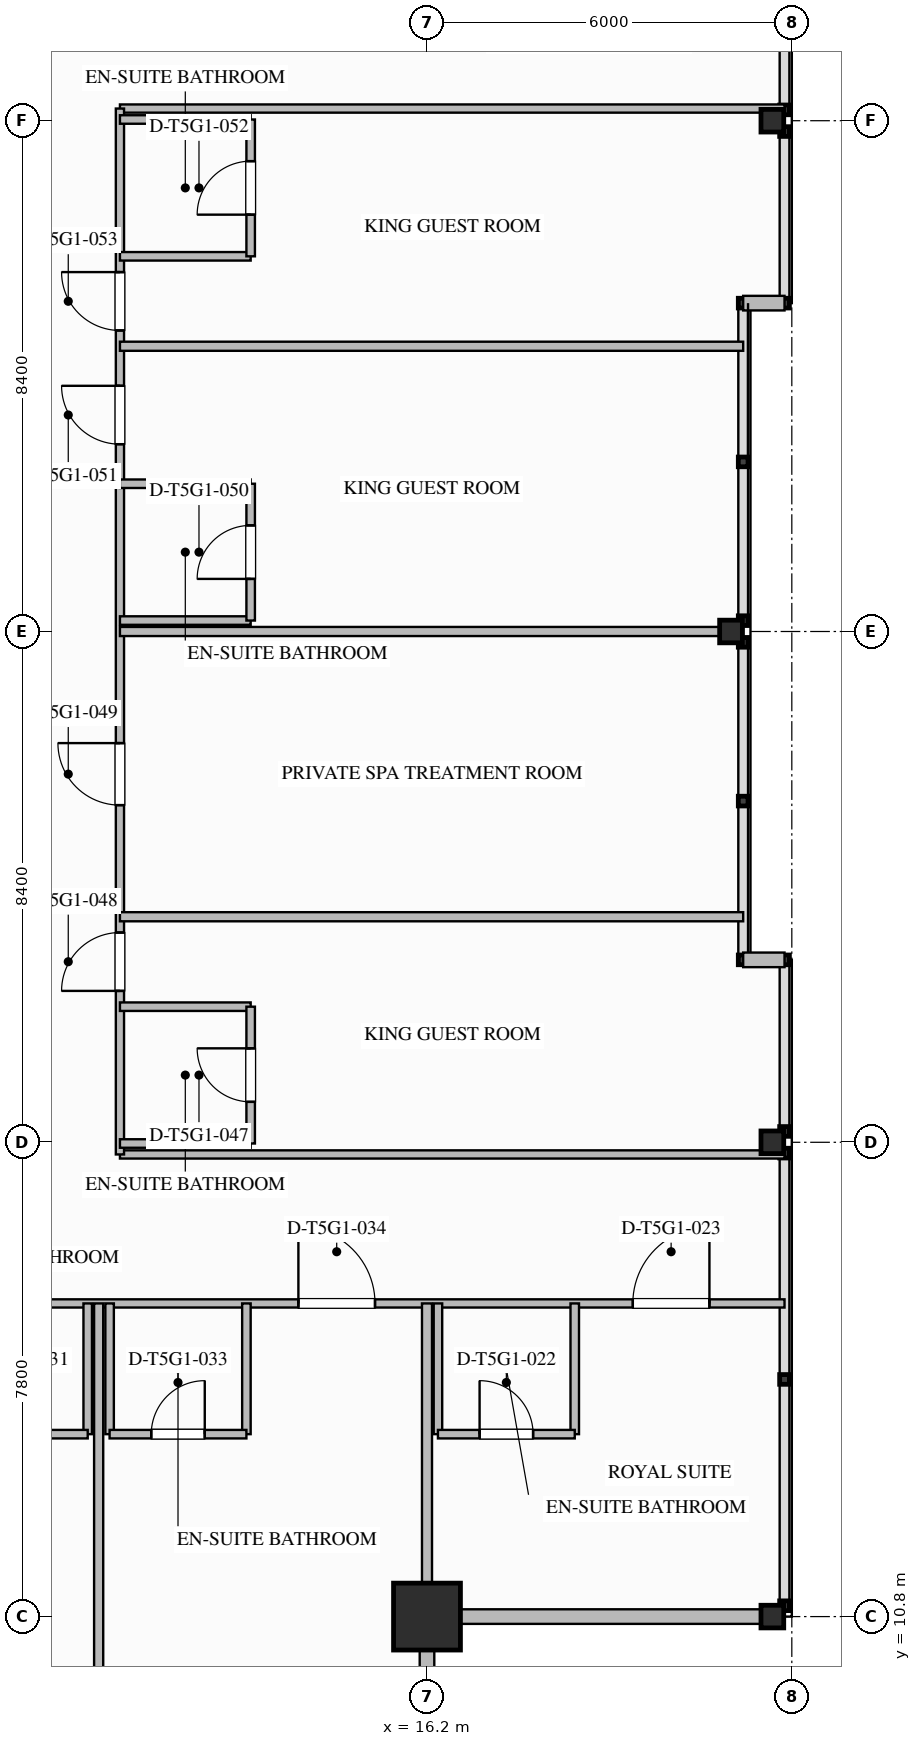
"""IFC4 building model, lengths in metres.
Left out: names, types, materials, properties, quantities, classifications, styles, units other than length and angle.
Written with IfcOpenShell. Run it as: python <this file> out.ifc"""

import sys

from ifc_helpers import new_model, si_unit, direction, frame, frame_2d, origin, origin_2d, place, context, subcontext, project, spatial, rectangle, i_section, extrude, element, fill, save


model = new_model("IFC4")
c1 = context("Model", 3, precision=1e-05, world=origin(), true_north=direction((0.0, 1.0)))
c2 = subcontext(c1, "Body", "Model", "MODEL_VIEW")
j1 = project(units=[si_unit("LENGTHUNIT", "METRE"), si_unit("PLANEANGLEUNIT", "RADIAN")], contexts=[c1])
p1 = place(None, origin())
s1 = spatial("IfcSite", under=j1, at=p1, CompositionType="ELEMENT")
p2 = place(p1, origin())
s2 = spatial("IfcBuilding", under=s1, at=p2, CompositionType="ELEMENT")
p3 = place(p2, frame((0.0, 0.0, 265.0)))
s3 = spatial("IfcBuildingStorey", under=s2, at=p3, CompositionType="ELEMENT", Elevation=265.0)
p4 = place(p3, frame((16.2, 10.8, 0.0), z_axis=(0.0, 0.0, 1.0), x_axis=(1.0, 0.0, 0.0)))
e1 = element("IfcColumn", 1, at=p4, inside=s3, PredefinedType="COLUMN", context=c2, shape_type="SweptSolid", body=[
    extrude(rectangle(XDim=1.1, YDim=1.1, at=origin_2d()), origin(), (0.0, 0.0, 1.0), 3.65),
])
for number, where, z_axis, x_axis in (
    (2, (21.88, 10.8, 0.0), (0.0, 0.0, 1.0), (1.0, 0.0, 0.0)),
    (3, (21.88, 18.6, 0.0), (0.0, 0.0, 1.0), (1.0, 0.0, 0.0)),
    (4, (21.2, 27.0, 0.0), (0.0, 0.0, 1.0), (1.0, 0.0, 0.0)),
    (5, (21.88, 35.4, 0.0), (0.0, 0.0, 1.0), (1.0, 0.0, 0.0)),
):
    element("IfcColumn", number, at=place(p3, frame(where, z_axis=z_axis, x_axis=x_axis)), inside=s3, PredefinedType="COLUMN", context=c2, shape_type="SweptSolid", body=[
        extrude(i_section(OverallWidth=0.374, OverallDepth=0.372, WebThickness=0.016, FlangeThickness=0.026, FilletRadius=0.025, at=origin_2d()), origin(), (0.0, 0.0, 1.0), 3.647),
    ])
for number, where, z_axis, x_axis in (
    (6, (22.08, 10.8, 0.0), (0.0, 0.0, 1.0), (-1.0, 0.0, 0.0)),
    (7, (16.2, 10.8, 0.0), (0.0, 0.0, 1.0), (0.0, -1.0, 0.0)),
):
    element("IfcWall", number, at=place(p3, frame(where, z_axis=z_axis, x_axis=x_axis)), inside=s3, PredefinedType="STANDARD", context=c2, shape_type="SweptSolid", body=[
        extrude(rectangle(XDim=5.88, YDim=0.24, at=frame_2d((2.94, 0.0))), origin(), (0.0, 0.0, 1.0), 2.779),
    ])
for number, where, z_axis, x_axis in (
    (8, (22.08, 32.4, 0.0), (0.0, 0.0, 1.0), (-1.0, 0.0, 0.0)),
    (9, (21.4, 21.6, 0.0), (0.0, 0.0, 1.0), (1.0, 0.0, 0.0)),
):
    element("IfcWall", number, at=place(p3, frame(where, z_axis=z_axis, x_axis=x_axis)), inside=s3, PredefinedType="STANDARD", context=c2, shape_type="SweptSolid", body=[
        extrude(rectangle(XDim=0.68, YDim=0.24, at=frame_2d((0.34, 0.0))), origin(), (0.0, 0.0, 1.0), 3.39),
    ])
p5 = place(p3, frame((-16.2, 15.95, 0.0), z_axis=(0.0, 0.0, 1.0), x_axis=(1.0, 0.0, 0.0)))
e10 = element("IfcWall", 10, at=p5, inside=s3, PredefinedType="PARTITIONING", context=c2, shape_type="SweptSolid", body=[
    extrude(rectangle(XDim=38.28, YDim=0.135, at=frame_2d((19.14, 0.0))), origin(), (0.0, 0.0, 1.0), 3.39),
])
p6 = place(p5, frame((35.785, 0.0, 0.0)))
e11 = element("IfcOpeningElement", 11, at=p6, cuts=e10, PredefinedType="OPENING", context=c2, shape_type="SweptSolid", body=[
    extrude(rectangle(XDim=1.26, YDim=2.2, at=frame_2d((0.63, 1.1))), frame((0.0, 0.077, 0.0), z_axis=(0.0, -1.0, 0.0), x_axis=(1.0, 0.0, 0.0)), (0.0, 0.0, 1.0), 0.155),
])
p7 = place(p5, frame((3.285, 0.0, 0.0)))
e12 = element("IfcOpeningElement", 12, at=p7, cuts=e10, PredefinedType="OPENING", context=c2, shape_type="SweptSolid", body=[
    extrude(rectangle(XDim=1.26, YDim=2.2, at=frame_2d((0.63, 1.1))), frame((0.0, 0.077, 0.0), z_axis=(0.0, -1.0, 0.0), x_axis=(1.0, 0.0, 0.0)), (0.0, 0.0, 1.0), 0.155),
])
p8 = place(p5, frame((7.335, 0.0, 0.0)))
e13 = element("IfcOpeningElement", 13, at=p8, cuts=e10, PredefinedType="OPENING", context=c2, shape_type="SweptSolid", body=[
    extrude(rectangle(XDim=1.26, YDim=2.2, at=frame_2d((0.63, 1.1))), frame((0.0, 0.077, 0.0), z_axis=(0.0, -1.0, 0.0), x_axis=(1.0, 0.0, 0.0)), (0.0, 0.0, 1.0), 0.155),
])
p9 = place(p5, frame((15.69, 0.0, 0.0)))
e14 = element("IfcOpeningElement", 14, at=p9, cuts=e10, PredefinedType="OPENING", context=c2, shape_type="SweptSolid", body=[
    extrude(rectangle(XDim=1.02, YDim=2.15, at=frame_2d((0.51, 1.075))), frame((0.0, 0.077, 0.0), z_axis=(0.0, -1.0, 0.0), x_axis=(1.0, 0.0, 0.0)), (0.0, 0.0, 1.0), 0.155),
])
p10 = place(p5, frame((21.375, 0.0, 0.0)))
e15 = element("IfcOpeningElement", 15, at=p10, cuts=e10, PredefinedType="OPENING", context=c2, shape_type="SweptSolid", body=[
    extrude(rectangle(XDim=1.26, YDim=2.2, at=frame_2d((0.63, 1.1))), frame((0.0, 0.077, 0.0), z_axis=(0.0, -1.0, 0.0), x_axis=(1.0, 0.0, 0.0)), (0.0, 0.0, 1.0), 0.155),
])
p11 = place(p5, frame((30.285, 0.0, 0.0)))
e16 = element("IfcOpeningElement", 16, at=p11, cuts=e10, PredefinedType="OPENING", context=c2, shape_type="SweptSolid", body=[
    extrude(rectangle(XDim=1.26, YDim=2.2, at=frame_2d((0.63, 1.1))), frame((0.0, 0.077, 0.0), z_axis=(0.0, -1.0, 0.0), x_axis=(1.0, 0.0, 0.0)), (0.0, 0.0, 1.0), 0.155),
])
for number, where, z_axis, x_axis in (
    (17, (11.15, 18.4, 0.0), (0.0, 0.0, 1.0), (1.0, 0.0, 0.0)),
    (18, (11.15, 35.6, 0.0), (0.0, 0.0, 1.0), (1.0, 0.0, 0.0)),
):
    element("IfcWall", number, at=place(p3, frame(where, z_axis=z_axis, x_axis=x_axis)), inside=s3, PredefinedType="PARTITIONING", context=c2, shape_type="SweptSolid", body=[
        extrude(rectangle(XDim=10.93, YDim=0.135, at=frame_2d((5.465, 0.0))), origin(), (0.0, 0.0, 1.0), 2.767),
    ])
p12 = place(p3, frame((11.15, 18.4, 0.0), z_axis=(0.0, 0.0, 1.0), x_axis=(0.0, 1.0, 0.0)))
e19 = element("IfcWall", 19, at=p12, inside=s3, PredefinedType="PARTITIONING", context=c2, shape_type="SweptSolid", body=[
    extrude(rectangle(XDim=17.2, YDim=0.135, at=frame_2d((8.6, 0.0))), origin(), (0.0, 0.0, 1.0), 3.39),
])
p13 = place(p12, frame((2.689, 0.0, 0.0)))
e20 = element("IfcOpeningElement", 20, at=p13, cuts=e19, PredefinedType="OPENING", context=c2, shape_type="SweptSolid", body=[
    extrude(rectangle(XDim=0.96, YDim=2.15, at=frame_2d((0.48, 1.075))), frame((0.0, 0.077, 0.0), z_axis=(0.0, -1.0, 0.0), x_axis=(1.0, 0.0, 0.0)), (0.0, 0.0, 1.0), 0.155),
])
p14 = place(p12, frame((5.745, 0.0, 0.0)))
e21 = element("IfcOpeningElement", 21, at=p14, cuts=e19, PredefinedType="OPENING", context=c2, shape_type="SweptSolid", body=[
    extrude(rectangle(XDim=1.02, YDim=2.15, at=frame_2d((0.51, 1.075))), frame((0.0, 0.077, 0.0), z_axis=(0.0, -1.0, 0.0), x_axis=(1.0, 0.0, 0.0)), (0.0, 0.0, 1.0), 0.155),
])
p15 = place(p12, frame((11.68, 0.0, 0.0)))
e22 = element("IfcOpeningElement", 22, at=p15, cuts=e19, PredefinedType="OPENING", context=c2, shape_type="SweptSolid", body=[
    extrude(rectangle(XDim=0.96, YDim=2.15, at=frame_2d((0.48, 1.075))), frame((0.0, 0.077, 0.0), z_axis=(0.0, -1.0, 0.0), x_axis=(1.0, 0.0, 0.0)), (0.0, 0.0, 1.0), 0.155),
])
p16 = place(p12, frame((13.551, 0.0, 0.0)))
e23 = element("IfcOpeningElement", 23, at=p16, cuts=e19, PredefinedType="OPENING", context=c2, shape_type="SweptSolid", body=[
    extrude(rectangle(XDim=0.96, YDim=2.15, at=frame_2d((0.48, 1.075))), frame((0.0, 0.077, 0.0), z_axis=(0.0, -1.0, 0.0), x_axis=(1.0, 0.0, 0.0)), (0.0, 0.0, 1.0), 0.155),
])
p17 = place(p3, frame((16.2, 10.92, 0.0), z_axis=(0.0, 0.0, 1.0), x_axis=(0.0, 1.0, 0.0)))
e24 = element("IfcWall", 24, at=p17, inside=s3, PredefinedType="PARTITIONING", context=c2, shape_type="SweptSolid", body=[
    extrude(rectangle(XDim=5.03, YDim=0.165, at=frame_2d((2.515, 0.0))), origin(), (0.0, 0.0, 1.0), 2.764),
])
p18 = place(p3, frame((16.38, 15.95, 0.0), z_axis=(0.0, 0.0, 1.0), x_axis=(0.0, -1.0, 0.0)))
e25 = element("IfcWall", 25, at=p18, inside=s3, PredefinedType="PLUMBINGWALL", context=c2, shape_type="SweptSolid", body=[
    extrude(rectangle(XDim=2.15, YDim=0.14, at=frame_2d((1.075, 0.0))), origin(), (0.0, 0.0, 1.0), 2.764),
])
p19 = place(p3, frame((18.63, 15.95, 0.0), z_axis=(0.0, 0.0, 1.0), x_axis=(0.0, -1.0, 0.0)))
e26 = element("IfcWall", 26, at=p19, inside=s3, PredefinedType="PLUMBINGWALL", context=c2, shape_type="SweptSolid", body=[
    extrude(rectangle(XDim=2.15, YDim=0.14, at=frame_2d((1.075, 0.0))), origin(), (0.0, 0.0, 1.0), 3.39),
])
p20 = place(p3, frame((16.38, 13.8, 0.0), z_axis=(0.0, 0.0, 1.0), x_axis=(1.0, 0.0, 0.0)))
e27 = element("IfcWall", 27, at=p20, inside=s3, PredefinedType="PLUMBINGWALL", context=c2, shape_type="SweptSolid", body=[
    extrude(rectangle(XDim=2.25, YDim=0.14, at=frame_2d((1.125, 0.0))), origin(), (0.0, 0.0, 1.0), 3.39),
])
p21 = place(p20, frame((0.685, 0.0, 0.0)))
e28 = element("IfcOpeningElement", 28, at=p21, cuts=e27, PredefinedType="OPENING", context=c2, shape_type="SweptSolid", body=[
    extrude(rectangle(XDim=0.88, YDim=2.1, at=frame_2d((0.44, 1.05))), frame((0.0, 0.08, 0.0), z_axis=(0.0, -1.0, 0.0), x_axis=(1.0, 0.0, 0.0)), (0.0, 0.0, 1.0), 0.16),
])
p22 = place(p3, frame((10.62, 15.95, 0.0), z_axis=(0.0, 0.0, 1.0), x_axis=(0.0, -1.0, 0.0)))
e29 = element("IfcWall", 29, at=p22, inside=s3, PredefinedType="PLUMBINGWALL", context=c2, shape_type="SweptSolid", body=[
    extrude(rectangle(XDim=2.15, YDim=0.14, at=frame_2d((1.075, 0.0))), origin(), (0.0, 0.0, 1.0), 3.39),
])
p23 = place(p3, frame((8.37, 13.8, 0.0), z_axis=(0.0, 0.0, 1.0), x_axis=(1.0, 0.0, 0.0)))
e30 = element("IfcWall", 30, at=p23, inside=s3, PredefinedType="PLUMBINGWALL", context=c2, shape_type="SweptSolid", body=[
    extrude(rectangle(XDim=2.25, YDim=0.14, at=frame_2d((1.125, 0.0))), origin(), (0.0, 0.0, 1.0), 3.39),
])
p24 = place(p23, frame((0.685, 0.0, 0.0)))
e31 = element("IfcOpeningElement", 31, at=p24, cuts=e30, PredefinedType="OPENING", context=c2, shape_type="SweptSolid", body=[
    extrude(rectangle(XDim=0.88, YDim=2.1, at=frame_2d((0.44, 1.05))), frame((0.0, 0.08, 0.0), z_axis=(0.0, -1.0, 0.0), x_axis=(1.0, 0.0, 0.0)), (0.0, 0.0, 1.0), 0.16),
])
p25 = place(p3, frame((10.8, 4.92, 0.0), z_axis=(0.0, 0.0, 1.0), x_axis=(0.0, 1.0, 0.0)))
e32 = element("IfcWall", 32, at=p25, inside=s3, PredefinedType="PARTITIONING", context=c2, shape_type="SweptSolid", body=[
    extrude(rectangle(XDim=11.03, YDim=0.15, at=frame_2d((5.515, 0.0))), origin(), (0.0, 0.0, 1.0), 3.39),
])
for number, where, z_axis, x_axis in (
    (33, (10.98, 15.95, 0.0), (0.0, 0.0, 1.0), (0.0, -1.0, 0.0)),
    (34, (13.23, 15.95, 0.0), (0.0, 0.0, 1.0), (0.0, -1.0, 0.0)),
):
    element("IfcWall", number, at=place(p3, frame(where, z_axis=z_axis, x_axis=x_axis)), inside=s3, PredefinedType="PLUMBINGWALL", context=c2, shape_type="SweptSolid", body=[
        extrude(rectangle(XDim=2.15, YDim=0.14, at=frame_2d((1.075, 0.0))), origin(), (0.0, 0.0, 1.0), 3.39),
    ])
p26 = place(p3, frame((10.98, 13.8, 0.0), z_axis=(0.0, 0.0, 1.0), x_axis=(1.0, 0.0, 0.0)))
e35 = element("IfcWall", 35, at=p26, inside=s3, PredefinedType="PLUMBINGWALL", context=c2, shape_type="SweptSolid", body=[
    extrude(rectangle(XDim=2.25, YDim=0.14, at=frame_2d((1.125, 0.0))), origin(), (0.0, 0.0, 1.0), 3.39),
])
p27 = place(p26, frame((0.685, 0.0, 0.0)))
e36 = element("IfcOpeningElement", 36, at=p27, cuts=e35, PredefinedType="OPENING", context=c2, shape_type="SweptSolid", body=[
    extrude(rectangle(XDim=0.88, YDim=2.1, at=frame_2d((0.44, 1.05))), frame((0.0, 0.08, 0.0), z_axis=(0.0, -1.0, 0.0), x_axis=(1.0, 0.0, 0.0)), (0.0, 0.0, 1.0), 0.16),
])
p28 = place(p3, frame((11.15, 18.58, 0.0), z_axis=(0.0, 0.0, 1.0), x_axis=(1.0, 0.0, 0.0)))
e37 = element("IfcWall", 37, at=p28, inside=s3, PredefinedType="PLUMBINGWALL", context=c2, shape_type="SweptSolid", body=[
    extrude(rectangle(XDim=2.15, YDim=0.14, at=frame_2d((1.075, 0.0))), origin(), (0.0, 0.0, 1.0), 2.767),
])
p29 = place(p3, frame((11.15, 20.83, 0.0), z_axis=(0.0, 0.0, 1.0), x_axis=(1.0, 0.0, 0.0)))
e38 = element("IfcWall", 38, at=p29, inside=s3, PredefinedType="PLUMBINGWALL", context=c2, shape_type="SweptSolid", body=[
    extrude(rectangle(XDim=2.15, YDim=0.14, at=frame_2d((1.075, 0.0))), origin(), (0.0, 0.0, 1.0), 3.39),
])
p30 = place(p3, frame((13.3, 18.58, 0.0), z_axis=(0.0, 0.0, 1.0), x_axis=(0.0, 1.0, 0.0)))
e39 = element("IfcWall", 39, at=p30, inside=s3, PredefinedType="PLUMBINGWALL", context=c2, shape_type="SweptSolid", body=[
    extrude(rectangle(XDim=2.25, YDim=0.14, at=frame_2d((1.125, 0.0))), origin(), (0.0, 0.0, 1.0), 3.39),
])
p31 = place(p30, frame((0.685, 0.0, 0.0)))
e40 = element("IfcOpeningElement", 40, at=p31, cuts=e39, PredefinedType="OPENING", context=c2, shape_type="SweptSolid", body=[
    extrude(rectangle(XDim=0.88, YDim=2.1, at=frame_2d((0.44, 1.05))), frame((0.0, 0.08, 0.0), z_axis=(0.0, -1.0, 0.0), x_axis=(1.0, 0.0, 0.0)), (0.0, 0.0, 1.0), 0.16),
])
p32 = place(p3, frame((11.15, 22.309, 0.0), z_axis=(0.0, 0.0, 1.0), x_axis=(1.0, 0.0, 0.0)))
e41 = element("IfcWall", 41, at=p32, inside=s3, PredefinedType="PARTITIONING", context=c2, shape_type="SweptSolid", body=[
    extrude(rectangle(XDim=10.25, YDim=0.15, at=frame_2d((5.125, 0.0))), origin(), (0.0, 0.0, 1.0), 3.39),
])
p33 = place(p3, frame((11.15, 27.0, 0.0), z_axis=(0.0, 0.0, 1.0), x_axis=(1.0, 0.0, 0.0)))
e42 = element("IfcWall", 42, at=p33, inside=s3, PredefinedType="PARTITIONING", context=c2, shape_type="SweptSolid", body=[
    extrude(rectangle(XDim=10.25, YDim=0.15, at=frame_2d((5.125, 0.0))), origin(), (0.0, 0.0, 1.0), 2.767),
])
p34 = place(p3, frame((11.15, 27.18, 0.0), z_axis=(0.0, 0.0, 1.0), x_axis=(1.0, 0.0, 0.0)))
e43 = element("IfcWall", 43, at=p34, inside=s3, PredefinedType="PLUMBINGWALL", context=c2, shape_type="SweptSolid", body=[
    extrude(rectangle(XDim=2.15, YDim=0.14, at=frame_2d((1.075, 0.0))), origin(), (0.0, 0.0, 1.0), 2.767),
])
p35 = place(p3, frame((11.15, 29.43, 0.0), z_axis=(0.0, 0.0, 1.0), x_axis=(1.0, 0.0, 0.0)))
e44 = element("IfcWall", 44, at=p35, inside=s3, PredefinedType="PLUMBINGWALL", context=c2, shape_type="SweptSolid", body=[
    extrude(rectangle(XDim=2.15, YDim=0.14, at=frame_2d((1.075, 0.0))), origin(), (0.0, 0.0, 1.0), 3.39),
])
p36 = place(p3, frame((13.3, 27.18, 0.0), z_axis=(0.0, 0.0, 1.0), x_axis=(0.0, 1.0, 0.0)))
e45 = element("IfcWall", 45, at=p36, inside=s3, PredefinedType="PLUMBINGWALL", context=c2, shape_type="SweptSolid", body=[
    extrude(rectangle(XDim=2.25, YDim=0.14, at=frame_2d((1.125, 0.0))), origin(), (0.0, 0.0, 1.0), 3.39),
])
p37 = place(p36, frame((0.685, 0.0, 0.0)))
e46 = element("IfcOpeningElement", 46, at=p37, cuts=e45, PredefinedType="OPENING", context=c2, shape_type="SweptSolid", body=[
    extrude(rectangle(XDim=0.88, YDim=2.1, at=frame_2d((0.44, 1.05))), frame((0.0, 0.08, 0.0), z_axis=(0.0, -1.0, 0.0), x_axis=(1.0, 0.0, 0.0)), (0.0, 0.0, 1.0), 0.16),
])
p38 = place(p3, frame((11.15, 31.691, 0.0), z_axis=(0.0, 0.0, 1.0), x_axis=(1.0, 0.0, 0.0)))
e47 = element("IfcWall", 47, at=p38, inside=s3, PredefinedType="PARTITIONING", context=c2, shape_type="SweptSolid", body=[
    extrude(rectangle(XDim=10.25, YDim=0.15, at=frame_2d((5.125, 0.0))), origin(), (0.0, 0.0, 1.0), 3.39),
])
p39 = place(p3, frame((11.15, 33.17, 0.0), z_axis=(0.0, 0.0, 1.0), x_axis=(1.0, 0.0, 0.0)))
e48 = element("IfcWall", 48, at=p39, inside=s3, PredefinedType="PLUMBINGWALL", context=c2, shape_type="SweptSolid", body=[
    extrude(rectangle(XDim=2.15, YDim=0.14, at=frame_2d((1.075, 0.0))), origin(), (0.0, 0.0, 1.0), 3.39),
])
p40 = place(p3, frame((11.15, 35.42, 0.0), z_axis=(0.0, 0.0, 1.0), x_axis=(1.0, 0.0, 0.0)))
e49 = element("IfcWall", 49, at=p40, inside=s3, PredefinedType="PLUMBINGWALL", context=c2, shape_type="SweptSolid", body=[
    extrude(rectangle(XDim=2.15, YDim=0.14, at=frame_2d((1.075, 0.0))), origin(), (0.0, 0.0, 1.0), 2.767),
])
p41 = place(p3, frame((13.3, 33.17, 0.0), z_axis=(0.0, 0.0, 1.0), x_axis=(0.0, 1.0, 0.0)))
e50 = element("IfcWall", 50, at=p41, inside=s3, PredefinedType="PLUMBINGWALL", context=c2, shape_type="SweptSolid", body=[
    extrude(rectangle(XDim=2.25, YDim=0.14, at=frame_2d((1.125, 0.0))), origin(), (0.0, 0.0, 1.0), 3.39),
])
p42 = place(p41, frame((0.685, 0.0, 0.0)))
e51 = element("IfcOpeningElement", 51, at=p42, cuts=e50, PredefinedType="OPENING", context=c2, shape_type="SweptSolid", body=[
    extrude(rectangle(XDim=0.88, YDim=2.1, at=frame_2d((0.44, 1.05))), frame((0.0, 0.08, 0.0), z_axis=(0.0, -1.0, 0.0), x_axis=(1.0, 0.0, 0.0)), (0.0, 0.0, 1.0), 0.16),
])
p43 = place(p21, origin())
e52 = element("IfcDoor", 52, at=p43, inside=s3, OperationType="SINGLE_SWING_LEFT", PredefinedType="DOOR", context=c2, shape_type="SweptSolid", body=[
    extrude(rectangle(XDim=0.88, YDim=2.1, at=frame_2d((0.44, 1.05))), frame((0.0, 0.025, 0.0), z_axis=(0.0, -1.0, 0.0), x_axis=(1.0, 0.0, 0.0)), (0.0, 0.0, 1.0), 0.05),
])
fill(e28, e52)
p44 = place(p6, origin())
e53 = element("IfcDoor", 53, at=p44, inside=s3, OperationType="SINGLE_SWING_RIGHT", PredefinedType="DOOR", context=c2, shape_type="SweptSolid", body=[
    extrude(rectangle(XDim=1.26, YDim=2.2, at=frame_2d((0.63, 1.1))), frame((0.0, 0.025, 0.0), z_axis=(0.0, -1.0, 0.0), x_axis=(1.0, 0.0, 0.0)), (0.0, 0.0, 1.0), 0.05),
])
fill(e11, e53)
p45 = place(p27, origin())
e54 = element("IfcDoor", 54, at=p45, inside=s3, OperationType="SINGLE_SWING_RIGHT", PredefinedType="DOOR", context=c2, shape_type="SweptSolid", body=[
    extrude(rectangle(XDim=0.88, YDim=2.1, at=frame_2d((0.44, 1.05))), frame((0.0, 0.025, 0.0), z_axis=(0.0, -1.0, 0.0), x_axis=(1.0, 0.0, 0.0)), (0.0, 0.0, 1.0), 0.05),
])
fill(e36, e54)
p46 = place(p11, origin())
e55 = element("IfcDoor", 55, at=p46, inside=s3, OperationType="SINGLE_SWING_LEFT", PredefinedType="DOOR", context=c2, shape_type="SweptSolid", body=[
    extrude(rectangle(XDim=1.26, YDim=2.2, at=frame_2d((0.63, 1.1))), frame((0.0, 0.025, 0.0), z_axis=(0.0, -1.0, 0.0), x_axis=(1.0, 0.0, 0.0)), (0.0, 0.0, 1.0), 0.05),
])
fill(e16, e55)
p47 = place(p31, origin())
e56 = element("IfcDoor", 56, at=p47, inside=s3, OperationType="SINGLE_SWING_RIGHT", PredefinedType="DOOR", context=c2, shape_type="SweptSolid", body=[
    extrude(rectangle(XDim=0.88, YDim=2.1, at=frame_2d((0.44, 1.05))), frame((0.0, 0.025, 0.0), z_axis=(0.0, -1.0, 0.0), x_axis=(1.0, 0.0, 0.0)), (0.0, 0.0, 1.0), 0.05),
])
fill(e40, e56)
p48 = place(p13, origin())
e57 = element("IfcDoor", 57, at=p48, inside=s3, OperationType="SINGLE_SWING_LEFT", PredefinedType="DOOR", context=c2, shape_type="SweptSolid", body=[
    extrude(rectangle(XDim=0.96, YDim=2.15, at=frame_2d((0.48, 1.075))), frame((0.0, 0.025, 0.0), z_axis=(0.0, -1.0, 0.0), x_axis=(1.0, 0.0, 0.0)), (0.0, 0.0, 1.0), 0.05),
])
fill(e20, e57)
p49 = place(p14, origin())
e58 = element("IfcDoor", 58, at=p49, inside=s3, OperationType="SINGLE_SWING_RIGHT", PredefinedType="DOOR", context=c2, shape_type="SweptSolid", body=[
    extrude(rectangle(XDim=1.02, YDim=2.15, at=frame_2d((0.51, 1.075))), frame((0.0, 0.025, 0.0), z_axis=(0.0, -1.0, 0.0), x_axis=(1.0, 0.0, 0.0)), (0.0, 0.0, 1.0), 0.05),
])
fill(e21, e58)
p50 = place(p37, origin())
e59 = element("IfcDoor", 59, at=p50, inside=s3, OperationType="SINGLE_SWING_LEFT", PredefinedType="DOOR", context=c2, shape_type="SweptSolid", body=[
    extrude(rectangle(XDim=0.88, YDim=2.1, at=frame_2d((0.44, 1.05))), frame((0.0, 0.025, 0.0), z_axis=(0.0, -1.0, 0.0), x_axis=(1.0, 0.0, 0.0)), (0.0, 0.0, 1.0), 0.05),
])
fill(e46, e59)
p51 = place(p15, origin())
e60 = element("IfcDoor", 60, at=p51, inside=s3, OperationType="SINGLE_SWING_RIGHT", PredefinedType="DOOR", context=c2, shape_type="SweptSolid", body=[
    extrude(rectangle(XDim=0.96, YDim=2.15, at=frame_2d((0.48, 1.075))), frame((0.0, 0.025, 0.0), z_axis=(0.0, -1.0, 0.0), x_axis=(1.0, 0.0, 0.0)), (0.0, 0.0, 1.0), 0.05),
])
fill(e22, e60)
p52 = place(p42, origin())
e61 = element("IfcDoor", 61, at=p52, inside=s3, OperationType="SINGLE_SWING_LEFT", PredefinedType="DOOR", context=c2, shape_type="SweptSolid", body=[
    extrude(rectangle(XDim=0.88, YDim=2.1, at=frame_2d((0.44, 1.05))), frame((0.0, 0.025, 0.0), z_axis=(0.0, -1.0, 0.0), x_axis=(1.0, 0.0, 0.0)), (0.0, 0.0, 1.0), 0.05),
])
fill(e51, e61)
p53 = place(p16, origin())
e62 = element("IfcDoor", 62, at=p53, inside=s3, OperationType="SINGLE_SWING_RIGHT", PredefinedType="DOOR", context=c2, shape_type="SweptSolid", body=[
    extrude(rectangle(XDim=0.96, YDim=2.15, at=frame_2d((0.48, 1.075))), frame((0.0, 0.025, 0.0), z_axis=(0.0, -1.0, 0.0), x_axis=(1.0, 0.0, 0.0)), (0.0, 0.0, 1.0), 0.05),
])
fill(e23, e62)
save(model, sys.argv[1])
